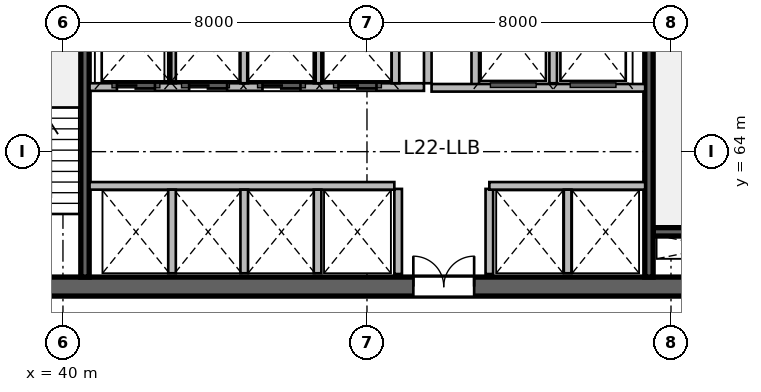
"""IFC4 building model, lengths in metres.
Left out: names, types, materials, properties, quantities, classifications, styles, units other than length and angle.
Written with IfcOpenShell. Run it as: python <this file> out.ifc"""

import sys

from ifc_helpers import new_model, si_unit, direction, frame, frame_2d, origin, place, context, subcontext, project, spatial, rectangle, extrude, source, transform, mapped, element, fill, save


model = new_model("IFC4")
c1 = context("Model", 3, precision=1e-05, world=origin(), true_north=direction((0.0, 1.0)))
c2 = subcontext(c1, "Body", "Model", "MODEL_VIEW")
j1 = project(units=[si_unit("LENGTHUNIT", "METRE"), si_unit("PLANEANGLEUNIT", "RADIAN")], contexts=[c1])
p1 = place(None, origin())
s1 = spatial("IfcSite", under=j1, at=p1, CompositionType="ELEMENT")
p2 = place(p1, origin())
s2 = spatial("IfcBuilding", under=s1, at=p2, CompositionType="ELEMENT")
p3 = place(p2, frame((0.0, 0.0, 96.0)))
s3 = spatial("IfcBuildingStorey", under=s2, at=p3, CompositionType="ELEMENT", Elevation=96.0)
m1 = source(origin(), c2, "Body", "SweptSolid", [
    extrude(rectangle(XDim=21.6, YDim=0.5, at=frame_2d((10.8, 0.0))), origin(), (0.0, 0.0, 1.0), 3.9),
])
p4 = place(p3, frame((37.2, 60.45, 0.0), z_axis=(0.0, 0.0, 1.0), x_axis=(1.0, 0.0, 0.0)))
e1 = element("IfcWall", 1, at=p4, inside=s3, PredefinedType="SHEAR", context=c2, shape_type="MappedRepresentation", body=[
    mapped(m1, transform((0.0, 0.0, 0.0), scale=1.0)),
])
p5 = place(p4, frame((1.1, 0.0, 0.0)))
e2 = element("IfcOpeningElement", 2, at=p5, cuts=e1, PredefinedType="OPENING", context=c2, shape_type="SweptSolid", body=[
    extrude(rectangle(XDim=1.15, YDim=2.15, at=frame_2d((0.575, 1.075))), frame((0.0, 0.26, 0.0), z_axis=(0.0, -1.0, 0.0), x_axis=(1.0, 0.0, 0.0)), (0.0, 0.0, 1.0), 0.52),
])
p6 = place(p4, frame((19.5, 0.0, 0.0)))
e3 = element("IfcOpeningElement", 3, at=p6, cuts=e1, PredefinedType="OPENING", context=c2, shape_type="SweptSolid", body=[
    extrude(rectangle(XDim=0.9, YDim=2.1, at=frame_2d((0.45, 1.05))), frame((0.0, 0.26, 0.0), z_axis=(0.0, -1.0, 0.0), x_axis=(1.0, 0.0, 0.0)), (0.0, 0.0, 1.0), 0.52),
])
p7 = place(p4, frame((12.02, 0.0, 0.0)))
e4 = element("IfcOpeningElement", 4, at=p7, cuts=e1, PredefinedType="OPENING", context=c2, shape_type="SweptSolid", body=[
    extrude(rectangle(XDim=1.6, YDim=2.15, at=frame_2d((0.8, 1.075))), frame((0.0, 0.26, 0.0), z_axis=(0.0, -1.0, 0.0), x_axis=(1.0, 0.0, 0.0)), (0.0, 0.0, 1.0), 0.52),
])
m2 = source(origin(), c2, "Body", "SweptSolid", [
    extrude(rectangle(XDim=3.27, YDim=0.22, at=frame_2d((1.635, 0.0))), origin(), (0.0, 0.0, 1.0), 3.9),
])
p8 = place(p3, frame((55.53, 61.89, 0.0), z_axis=(0.0, 0.0, 1.0), x_axis=(1.0, 0.0, 0.0)))
e5 = element("IfcWall", 5, at=p8, inside=s3, PredefinedType="SHEAR", context=c2, shape_type="MappedRepresentation", body=[
    mapped(m2, transform((0.0, 0.0, 0.0), scale=1.0)),
])
m3 = source(origin(), c2, "Body", "SweptSolid", [
    extrude(rectangle(XDim=11.0, YDim=0.22, at=frame_2d((5.5, 0.0))), origin(), (0.0, 0.0, 1.0), 3.9),
])
p9 = place(p3, frame((40.58, 60.7, 0.0), z_axis=(0.0, 0.0, 1.0), x_axis=(0.0, 1.0, 0.0)))
e6 = element("IfcWall", 6, at=p9, inside=s3, PredefinedType="SHEAR", context=c2, shape_type="MappedRepresentation", body=[
    mapped(m3, transform((0.0, 0.0, 0.0), scale=1.0)),
])
p10 = place(p3, frame((55.42, 60.7, 0.0), z_axis=(0.0, 0.0, 1.0), x_axis=(0.0, 1.0, 0.0)))
e7 = element("IfcWall", 7, at=p10, inside=s3, PredefinedType="SHEAR", context=c2, shape_type="MappedRepresentation", body=[
    mapped(m3, transform((0.0, 0.0, 0.0), scale=1.0)),
])
p11 = place(p10, frame((9.545, 0.0, 0.0)))
e8 = element("IfcOpeningElement", 8, at=p11, cuts=e7, PredefinedType="OPENING", context=c2, shape_type="SweptSolid", body=[
    extrude(rectangle(XDim=1.15, YDim=2.15, at=frame_2d((0.575, 1.075))), frame((0.0, 0.12, 0.0), z_axis=(0.0, -1.0, 0.0), x_axis=(1.0, 0.0, 0.0)), (0.0, 0.0, 1.0), 0.24),
])
m4 = source(origin(), c2, "Body", "SweptSolid", [
    extrude(rectangle(XDim=2.24, YDim=0.2, at=frame_2d((1.12, 0.0))), origin(), (0.0, 0.0, 1.0), 3.65),
])
for number, where, z_axis, x_axis in (
    (9, (48.82, 60.78, 0.0), (0.0, 0.0, 1.0), (0.0, 1.0, 0.0)),
    (10, (51.22, 60.78, 0.0), (0.0, 0.0, 1.0), (0.0, 1.0, 0.0)),
):
    element("IfcWall", number, at=place(p3, frame(where, z_axis=z_axis, x_axis=x_axis)), inside=s3, PredefinedType="SOLIDWALL", context=c2, shape_type="MappedRepresentation", body=[
        mapped(m4, transform((0.0, 0.0, 0.0), scale=1.0)),
    ])
m5 = source(origin(), c2, "Body", "SweptSolid", [
    extrude(rectangle(XDim=5.8, YDim=0.2, at=frame_2d((2.9, 0.0))), origin(), (0.0, 0.0, 1.0), 3.65),
])
p12 = place(p3, frame((49.6, 65.8, 0.0), z_axis=(0.0, 0.0, 1.0), x_axis=(0.0, 1.0, 0.0)))
e11 = element("IfcWall", 11, at=p12, inside=s3, PredefinedType="SOLIDWALL", context=c2, shape_type="MappedRepresentation", body=[
    mapped(m5, transform((0.0, 0.0, 0.0), scale=1.0)),
])
m6 = source(origin(), c2, "Body", "SweptSolid", [
    extrude(rectangle(XDim=2.58, YDim=0.2, at=frame_2d((1.29, 0.0))), origin(), (0.0, 0.0, 1.0), 3.65),
])
p13 = place(p3, frame((50.85, 65.68, 0.0), z_axis=(0.0, 0.0, 1.0), x_axis=(0.0, 1.0, 0.0)))
e12 = element("IfcWall", 12, at=p13, inside=s3, PredefinedType="SOLIDWALL", context=c2, shape_type="MappedRepresentation", body=[
    mapped(m6, transform((0.0, 0.0, 0.0), scale=1.0)),
])
m7 = source(origin(), c2, "Body", "SweptSolid", [
    extrude(rectangle(XDim=2.4, YDim=0.2, at=frame_2d((1.2, 0.0))), origin(), (0.0, 0.0, 1.0), 3.65),
])
p14 = place(p3, frame((52.9, 65.8, 0.0), z_axis=(0.0, 0.0, 1.0), x_axis=(0.0, 1.0, 0.0)))
e13 = element("IfcWall", 13, at=p14, inside=s3, PredefinedType="SOLIDWALL", context=c2, shape_type="MappedRepresentation", body=[
    mapped(m7, transform((0.0, 0.0, 0.0), scale=1.0)),
])
m8 = source(origin(), c2, "Body", "SweptSolid", [
    extrude(rectangle(XDim=5.62, YDim=0.2, at=frame_2d((2.81, 0.0))), origin(), (0.0, 0.0, 1.0), 3.65),
])
p15 = place(p3, frame((49.7, 65.68, 0.0), z_axis=(0.0, 0.0, 1.0), x_axis=(1.0, 0.0, 0.0)))
e14 = element("IfcWall", 14, at=p15, inside=s3, PredefinedType="SOLIDWALL", context=c2, shape_type="MappedRepresentation", body=[
    mapped(m8, transform((0.0, 0.0, 0.0), scale=1.0)),
])
m9 = source(origin(), c2, "Body", "SweptSolid", [
    extrude(rectangle(XDim=8.02, YDim=0.2, at=frame_2d((4.01, 0.0))), origin(), (0.0, 0.0, 1.0), 3.65),
])
p16 = place(p3, frame((40.7, 63.1, 0.0), z_axis=(0.0, 0.0, 1.0), x_axis=(1.0, 0.0, 0.0)))
e15 = element("IfcWall", 15, at=p16, inside=s3, PredefinedType="SOLIDWALL", context=c2, shape_type="MappedRepresentation", body=[
    mapped(m9, transform((0.0, 0.0, 0.0), scale=1.0)),
])
m10 = source(origin(), c2, "Body", "SweptSolid", [
    extrude(rectangle(XDim=4.1, YDim=0.2, at=frame_2d((2.05, 0.0))), origin(), (0.0, 0.0, 1.0), 3.65),
])
p17 = place(p3, frame((51.22, 63.1, 0.0), z_axis=(0.0, 0.0, 1.0), x_axis=(1.0, 0.0, 0.0)))
e16 = element("IfcWall", 16, at=p17, inside=s3, PredefinedType="SOLIDWALL", context=c2, shape_type="MappedRepresentation", body=[
    mapped(m10, transform((0.0, 0.0, 0.0), scale=1.0)),
])
m11 = source(origin(), c2, "Body", "SweptSolid", [
    extrude(rectangle(XDim=2.2, YDim=0.2, at=frame_2d((1.1, 0.0))), origin(), (0.0, 0.0, 1.0), 3.65),
])
for number, where, z_axis, x_axis in (
    (17, (42.87, 60.8, 0.0), (0.0, 0.0, 1.0), (0.0, 1.0, 0.0)),
    (18, (44.77, 60.8, 0.0), (0.0, 0.0, 1.0), (0.0, 1.0, 0.0)),
    (19, (46.7, 60.8, 0.0), (0.0, 0.0, 1.0), (0.0, 1.0, 0.0)),
    (20, (53.28, 60.8, 0.0), (0.0, 0.0, 1.0), (0.0, 1.0, 0.0)),
):
    element("IfcWall", number, at=place(p3, frame(where, z_axis=z_axis, x_axis=x_axis)), inside=s3, PredefinedType="SOLIDWALL", context=c2, shape_type="MappedRepresentation", body=[
        mapped(m11, transform((0.0, 0.0, 0.0), scale=1.0)),
    ])
m12 = source(origin(), c2, "Body", "SweptSolid", [
    extrude(rectangle(XDim=8.8, YDim=0.2, at=frame_2d((4.4, 0.0))), origin(), (0.0, 0.0, 1.0), 3.65),
])
p18 = place(p3, frame((40.7, 65.7, 0.0), z_axis=(0.0, 0.0, 1.0), x_axis=(1.0, 0.0, 0.0)))
e21 = element("IfcWall", 21, at=p18, inside=s3, PredefinedType="SOLIDWALL", context=c2, shape_type="MappedRepresentation", body=[
    mapped(m12, transform((0.0, 0.0, 0.0), scale=1.0)),
])
p19 = place(p18, frame((0.72, 0.0, 0.0)))
e22 = element("IfcOpeningElement", 22, at=p19, cuts=e21, PredefinedType="OPENING", context=c2, shape_type="SweptSolid", body=[
    extrude(rectangle(XDim=1.0, YDim=2.15, at=frame_2d((0.5, 1.075))), frame((0.0, 0.11, 0.0), z_axis=(0.0, -1.0, 0.0), x_axis=(1.0, 0.0, 0.0)), (0.0, 0.0, 1.0), 0.22),
])
p20 = place(p18, frame((2.62, 0.0, 0.0)))
e23 = element("IfcOpeningElement", 23, at=p20, cuts=e21, PredefinedType="OPENING", context=c2, shape_type="SweptSolid", body=[
    extrude(rectangle(XDim=1.0, YDim=2.15, at=frame_2d((0.5, 1.075))), frame((0.0, 0.11, 0.0), z_axis=(0.0, -1.0, 0.0), x_axis=(1.0, 0.0, 0.0)), (0.0, 0.0, 1.0), 0.22),
])
p21 = place(p18, frame((4.55, 0.0, 0.0)))
e24 = element("IfcOpeningElement", 24, at=p21, cuts=e21, PredefinedType="OPENING", context=c2, shape_type="SweptSolid", body=[
    extrude(rectangle(XDim=1.0, YDim=2.15, at=frame_2d((0.5, 1.075))), frame((0.0, 0.11, 0.0), z_axis=(0.0, -1.0, 0.0), x_axis=(1.0, 0.0, 0.0)), (0.0, 0.0, 1.0), 0.22),
])
p22 = place(p18, frame((6.55, 0.0, 0.0)))
e25 = element("IfcOpeningElement", 25, at=p22, cuts=e21, PredefinedType="OPENING", context=c2, shape_type="SweptSolid", body=[
    extrude(rectangle(XDim=1.0, YDim=2.15, at=frame_2d((0.5, 1.075))), frame((0.0, 0.11, 0.0), z_axis=(0.0, -1.0, 0.0), x_axis=(1.0, 0.0, 0.0)), (0.0, 0.0, 1.0), 0.22),
])
for number, where, z_axis, x_axis in (
    (26, (48.75, 65.8, 0.0), (0.0, 0.0, 1.0), (0.0, 1.0, 0.0)),
    (27, (42.87, 65.8, 0.0), (0.0, 0.0, 1.0), (0.0, 1.0, 0.0)),
    (28, (44.77, 65.8, 0.0), (0.0, 0.0, 1.0), (0.0, 1.0, 0.0)),
    (29, (46.7, 65.8, 0.0), (0.0, 0.0, 1.0), (0.0, 1.0, 0.0)),
):
    element("IfcWall", number, at=place(p3, frame(where, z_axis=z_axis, x_axis=x_axis)), inside=s3, PredefinedType="SOLIDWALL", context=c2, shape_type="MappedRepresentation", body=[
        mapped(m7, transform((0.0, 0.0, 0.0), scale=1.0)),
    ])
m13 = source(origin(), c2, "Body", "SweptSolid", [
    extrude(rectangle(XDim=1.6, YDim=2.15, at=frame_2d((0.8, 1.075))), frame((0.0, 0.025, 0.0), z_axis=(0.0, -1.0, 0.0), x_axis=(1.0, 0.0, 0.0)), (0.0, 0.0, 1.0), 0.05),
])
p23 = place(p7, origin())
e30 = element("IfcDoor", 30, at=p23, inside=s3, OperationType="DOUBLE_DOOR_SINGLE_SWING", PredefinedType="DOOR", context=c2, shape_type="MappedRepresentation", body=[
    mapped(m13, transform((0.0, 0.0, 0.0), scale=1.0)),
])
fill(e4, e30)
m14 = source(origin(), c2, "Body", "SweptSolid", [
    extrude(rectangle(XDim=1.0, YDim=2.15, at=frame_2d((0.5, 1.075))), frame((0.0, 0.025, 0.0), z_axis=(0.0, -1.0, 0.0), x_axis=(1.0, 0.0, 0.0)), (0.0, 0.0, 1.0), 0.05),
])
p24 = place(p19, origin())
e31 = element("IfcDoor", 31, at=p24, inside=s3, OperationType="DOUBLE_DOOR_SLIDING", PredefinedType="DOOR", context=c2, shape_type="MappedRepresentation", body=[
    mapped(m14, transform((0.0, 0.0, 0.0), scale=1.0)),
])
fill(e22, e31)
p25 = place(p20, origin())
e32 = element("IfcDoor", 32, at=p25, inside=s3, OperationType="DOUBLE_DOOR_SLIDING", PredefinedType="DOOR", context=c2, shape_type="MappedRepresentation", body=[
    mapped(m14, transform((0.0, 0.0, 0.0), scale=1.0)),
])
fill(e23, e32)
p26 = place(p21, origin())
e33 = element("IfcDoor", 33, at=p26, inside=s3, OperationType="DOUBLE_DOOR_SLIDING", PredefinedType="DOOR", context=c2, shape_type="MappedRepresentation", body=[
    mapped(m14, transform((0.0, 0.0, 0.0), scale=1.0)),
])
fill(e24, e33)
p27 = place(p22, origin())
e34 = element("IfcDoor", 34, at=p27, inside=s3, OperationType="DOUBLE_DOOR_SLIDING", PredefinedType="DOOR", context=c2, shape_type="MappedRepresentation", body=[
    mapped(m14, transform((0.0, 0.0, 0.0), scale=1.0)),
])
fill(e25, e34)
save(model, sys.argv[1])
